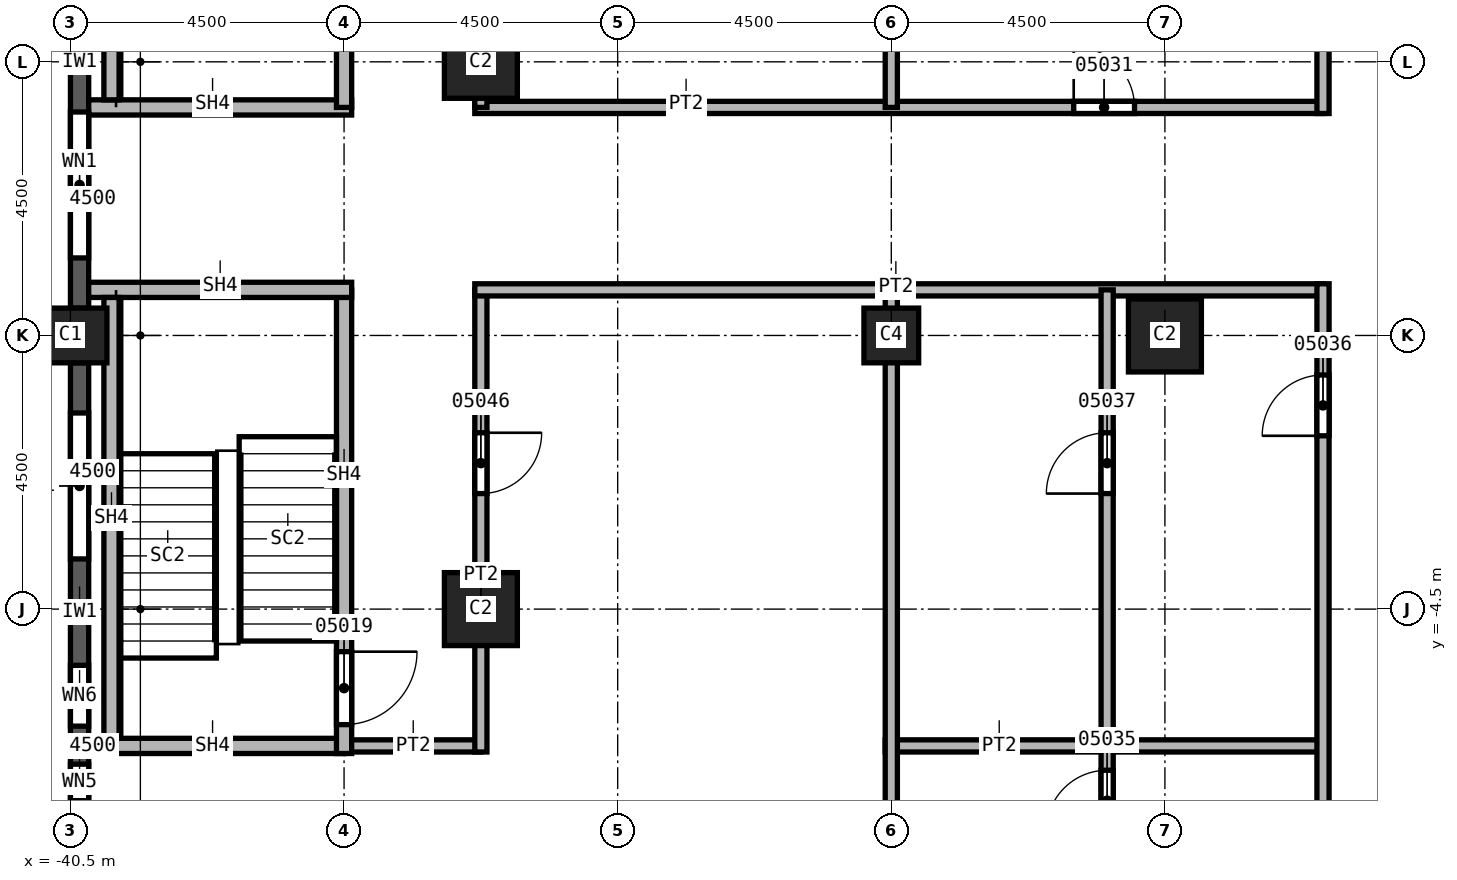
"""IFC4 building model, lengths in metres.
Left out: names, types, materials, properties, quantities, classifications, styles, units other than length and angle.
Written with IfcOpenShell. Run it as: python <this file> out.ifc"""

import sys

from ifc_helpers import new_model, si_unit, direction, frame, frame_2d, origin, origin_2d, place, context, subcontext, project, spatial, rectangle, extrude, element, fill, save


model = new_model("IFC4")
c1 = context("Model", 3, precision=1e-05, world=origin(), true_north=direction((0.0, 1.0)))
c2 = subcontext(c1, "Body", "Model", "MODEL_VIEW")
j1 = project(units=[si_unit("LENGTHUNIT", "METRE"), si_unit("PLANEANGLEUNIT", "RADIAN")], contexts=[c1])
p1 = place(None, origin())
s1 = spatial("IfcSite", under=j1, at=p1, CompositionType="ELEMENT")
p2 = place(p1, origin())
s2 = spatial("IfcBuilding", under=s1, at=p2, CompositionType="ELEMENT")
p3 = place(p2, frame((0.0, 0.0, 112.0)))
s3 = spatial("IfcBuildingStorey", under=s2, at=p3, CompositionType="ELEMENT", Elevation=112.0)
p4 = place(p3, frame((-40.5, 0.0, 0.0), z_axis=(0.0, 0.0, 1.0), x_axis=(0.0, 1.0, 0.0)))
e1 = element("IfcColumn", 1, at=p4, inside=s3, PredefinedType="COLUMN", context=c2, shape_type="SweptSolid", body=[
    extrude(rectangle(XDim=0.9, YDim=1.2, at=origin_2d()), origin(), (0.0, 0.0, 1.0), 3.7),
])
for number, where, z_axis, x_axis in (
    (2, (-33.75, 4.5, 0.0), (0.0, 0.0, 1.0), (1.0, 0.0, 0.0)),
    (3, (-33.75, -4.5, 0.0), (0.0, 0.0, 1.0), (1.0, 0.0, 0.0)),
    (4, (-22.5, 0.0, 0.0), (0.0, 0.0, 1.0), (1.0, 0.0, 0.0)),
):
    element("IfcColumn", number, at=place(p3, frame(where, z_axis=z_axis, x_axis=x_axis)), inside=s3, PredefinedType="COLUMN", context=c2, shape_type="SweptSolid", body=[
        extrude(rectangle(XDim=1.2, YDim=1.2, at=origin_2d()), origin(), (0.0, 0.0, 1.0), 3.7),
    ])
p5 = place(p3, frame((-27.0, 0.0, 0.0), z_axis=(0.0, 0.0, 1.0), x_axis=(1.0, 0.0, 0.0)))
e5 = element("IfcColumn", 5, at=p5, inside=s3, PredefinedType="COLUMN", context=c2, shape_type="SweptSolid", body=[
    extrude(rectangle(XDim=0.9, YDim=0.9, at=origin_2d()), origin(), (0.0, 0.0, 1.0), 3.7),
])
p6 = place(p3, frame((-40.35, 8.55, 0.0), z_axis=(0.0, 0.0, 1.0), x_axis=(0.0, -1.0, 0.0)))
e6 = element("IfcWall", 6, at=p6, inside=s3, PredefinedType="SOLIDWALL", context=c2, shape_type="SweptSolid", body=[
    extrude(rectangle(XDim=8.1, YDim=0.3, at=frame_2d((4.05, 0.0))), origin(), (0.0, 0.0, 1.0), 3.1),
])
p7 = place(p6, frame((0.825, 0.0, 0.8)))
e7 = element("IfcOpeningElement", 7, at=p7, cuts=e6, PredefinedType="OPENING", context=c2, shape_type="SweptSolid", body=[
    extrude(rectangle(XDim=2.4, YDim=1.95, at=frame_2d((1.2, 0.975))), frame((0.0, 0.15, 0.0), z_axis=(0.0, -1.0, 0.0), x_axis=(1.0, 0.0, 0.0)), (0.0, 0.0, 1.0), 0.3),
])
p8 = place(p6, frame((4.875, 0.0, 0.8)))
e8 = element("IfcOpeningElement", 8, at=p8, cuts=e6, PredefinedType="OPENING", context=c2, shape_type="SweptSolid", body=[
    extrude(rectangle(XDim=2.4, YDim=1.95, at=frame_2d((1.2, 0.975))), frame((0.0, 0.15, 0.0), z_axis=(0.0, -1.0, 0.0), x_axis=(1.0, 0.0, 0.0)), (0.0, 0.0, 1.0), 0.3),
])
p9 = place(p3, frame((-40.35, -0.45, 0.0), z_axis=(0.0, 0.0, 1.0), x_axis=(0.0, -1.0, 0.0)))
e9 = element("IfcWall", 9, at=p9, inside=s3, PredefinedType="SOLIDWALL", context=c2, shape_type="SweptSolid", body=[
    extrude(rectangle(XDim=8.1, YDim=0.3, at=frame_2d((4.05, 0.0))), origin(), (0.0, 0.0, 1.0), 3.1),
])
p10 = place(p9, frame((0.825, 0.0, 0.8)))
e10 = element("IfcOpeningElement", 10, at=p10, cuts=e9, PredefinedType="OPENING", context=c2, shape_type="SweptSolid", body=[
    extrude(rectangle(XDim=2.4, YDim=1.95, at=frame_2d((1.2, 0.975))), frame((0.0, 0.15, 0.0), z_axis=(0.0, -1.0, 0.0), x_axis=(1.0, 0.0, 0.0)), (0.0, 0.0, 1.0), 0.3),
])
p11 = place(p9, frame((4.975, 0.0, 0.8)))
e11 = element("IfcOpeningElement", 11, at=p11, cuts=e9, PredefinedType="OPENING", context=c2, shape_type="SweptSolid", body=[
    extrude(rectangle(XDim=1.0, YDim=1.95, at=frame_2d((0.5, 0.975))), frame((0.0, 0.15, 0.0), z_axis=(0.0, -1.0, 0.0), x_axis=(1.0, 0.0, 0.0)), (0.0, 0.0, 1.0), 0.3),
])
p12 = place(p9, frame((6.6, 0.0, 0.8)))
e12 = element("IfcOpeningElement", 12, at=p12, cuts=e9, PredefinedType="OPENING", context=c2, shape_type="SweptSolid", body=[
    extrude(rectangle(XDim=0.6, YDim=1.95, at=frame_2d((0.3, 0.975))), frame((0.0, 0.15, 0.0), z_axis=(0.0, -1.0, 0.0), x_axis=(1.0, 0.0, 0.0)), (0.0, 0.0, 1.0), 0.3),
])
p13 = place(p3, frame((-33.85, 3.75, 0.0), z_axis=(0.0, 0.0, 1.0), x_axis=(1.0, 0.0, 0.0)))
e13 = element("IfcWall", 13, at=p13, inside=s3, PredefinedType="PARTITIONING", context=c2, shape_type="SweptSolid", body=[
    extrude(rectangle(XDim=13.95, YDim=0.2, at=frame_2d((6.975, 0.0))), origin(), (0.0, 0.0, 1.0), 3.7),
])
p14 = place(p13, frame((9.85, 0.0, 0.0)))
e14 = element("IfcOpeningElement", 14, at=p14, cuts=e13, PredefinedType="OPENING", context=c2, shape_type="SweptSolid", body=[
    extrude(rectangle(XDim=1.0, YDim=2.1, at=frame_2d((0.5, 1.05))), frame((0.0, 0.1, 0.0), z_axis=(0.0, -1.0, 0.0), x_axis=(1.0, 0.0, 0.0)), (0.0, 0.0, 1.0), 0.2),
])
p15 = place(p3, frame((-33.75, -6.75, 0.0), z_axis=(0.0, 0.0, 1.0), x_axis=(-1.0, 0.0, 0.0)))
e15 = element("IfcWall", 15, at=p15, inside=s3, PredefinedType="PARTITIONING", context=c2, shape_type="SweptSolid", body=[
    extrude(rectangle(XDim=2.25, YDim=0.2, at=frame_2d((1.125, 0.0))), origin(), (0.0, 0.0, 1.0), 3.7),
])
p16 = place(p3, frame((-33.75, 0.75, 0.0), z_axis=(0.0, 0.0, 1.0), x_axis=(0.0, -1.0, 0.0)))
e16 = element("IfcWall", 16, at=p16, inside=s3, PredefinedType="PARTITIONING", context=c2, shape_type="SweptSolid", body=[
    extrude(rectangle(XDim=7.6, YDim=0.2, at=frame_2d((3.8, 0.0))), origin(), (0.0, 0.0, 1.0), 3.7),
])
p17 = place(p16, frame((2.35, 0.0, 0.0)))
e17 = element("IfcOpeningElement", 17, at=p17, cuts=e16, PredefinedType="OPENING", context=c2, shape_type="SweptSolid", body=[
    extrude(rectangle(XDim=1.0, YDim=2.1, at=frame_2d((0.5, 1.05))), frame((0.0, 0.1, 0.0), z_axis=(0.0, -1.0, 0.0), x_axis=(1.0, 0.0, 0.0)), (0.0, 0.0, 1.0), 0.2),
])
p18 = place(p3, frame((-33.75, 11.25, 0.0), z_axis=(0.0, 0.0, 1.0), x_axis=(0.0, -1.0, 0.0)))
e18 = element("IfcWall", 18, at=p18, inside=s3, PredefinedType="PARTITIONING", context=c2, shape_type="SweptSolid", body=[
    extrude(rectangle(XDim=7.5, YDim=0.2, at=frame_2d((3.75, 0.0))), origin(), (0.0, 0.0, 1.0), 3.7),
])
p19 = place(p18, frame((3.25, 0.0, 0.0)))
e19 = element("IfcOpeningElement", 19, at=p19, cuts=e18, PredefinedType="OPENING", context=c2, shape_type="SweptSolid", body=[
    extrude(rectangle(XDim=1.0, YDim=2.1, at=frame_2d((0.5, 1.05))), frame((0.0, 0.1, 0.0), z_axis=(0.0, -1.0, 0.0), x_axis=(1.0, 0.0, 0.0)), (0.0, 0.0, 1.0), 0.2),
])
p20 = place(p3, frame((-27.1, -6.75, 0.0), z_axis=(0.0, 0.0, 1.0), x_axis=(1.0, 0.0, 0.0)))
e20 = element("IfcWall", 20, at=p20, inside=s3, PredefinedType="PARTITIONING", context=c2, shape_type="SweptSolid", body=[
    extrude(rectangle(XDim=7.2, YDim=0.2, at=frame_2d((3.6, 0.0))), origin(), (0.0, 0.0, 1.0), 3.7),
])
p21 = place(p3, frame((-27.0, -17.4, 0.0), z_axis=(0.0, 0.0, 1.0), x_axis=(0.0, 1.0, 0.0)))
e21 = element("IfcWall", 21, at=p21, inside=s3, PredefinedType="PARTITIONING", context=c2, shape_type="SweptSolid", body=[
    extrude(rectangle(XDim=18.15, YDim=0.2, at=frame_2d((9.075, 0.0))), origin(), (0.0, 0.0, 1.0), 3.7),
])
p22 = place(p3, frame((-27.0, 3.75, 0.0), z_axis=(0.0, 0.0, 1.0), x_axis=(0.0, 1.0, 0.0)))
e22 = element("IfcWall", 22, at=p22, inside=s3, PredefinedType="PARTITIONING", context=c2, shape_type="SweptSolid", body=[
    extrude(rectangle(XDim=13.65, YDim=0.2, at=frame_2d((6.825, 0.0))), origin(), (0.0, 0.0, 1.0), 3.7),
])
p23 = place(p3, frame((-19.9, 0.75, 0.0), z_axis=(0.0, 0.0, 1.0), x_axis=(-1.0, 0.0, 0.0)))
e23 = element("IfcWall", 23, at=p23, inside=s3, PredefinedType="PARTITIONING", context=c2, shape_type="SweptSolid", body=[
    extrude(rectangle(XDim=13.95, YDim=0.2, at=frame_2d((6.975, 0.0))), origin(), (0.0, 0.0, 1.0), 3.7),
])
p24 = place(p3, frame((-23.45, -15.75, 0.0), z_axis=(0.0, 0.0, 1.0), x_axis=(0.0, 1.0, 0.0)))
e24 = element("IfcWall", 24, at=p24, inside=s3, PredefinedType="PARTITIONING", context=c2, shape_type="SweptSolid", body=[
    extrude(rectangle(XDim=16.5, YDim=0.2, at=frame_2d((8.25, 0.0))), origin(), (0.0, 0.0, 1.0), 3.7),
])
p25 = place(p24, frame((7.6, 0.0, 0.0)))
e25 = element("IfcOpeningElement", 25, at=p25, cuts=e24, PredefinedType="OPENING", context=c2, shape_type="SweptSolid", body=[
    extrude(rectangle(XDim=1.0, YDim=2.1, at=frame_2d((0.5, 1.05))), frame((0.0, 0.1, 0.0), z_axis=(0.0, -1.0, 0.0), x_axis=(1.0, 0.0, 0.0)), (0.0, 0.0, 1.0), 0.2),
])
p26 = place(p24, frame((13.15, 0.0, 0.0)))
e26 = element("IfcOpeningElement", 26, at=p26, cuts=e24, PredefinedType="OPENING", context=c2, shape_type="SweptSolid", body=[
    extrude(rectangle(XDim=1.0, YDim=2.1, at=frame_2d((0.5, 1.05))), frame((0.0, 0.1, 0.0), z_axis=(0.0, -1.0, 0.0), x_axis=(1.0, 0.0, 0.0)), (0.0, 0.0, 1.0), 0.2),
])
p27 = place(p3, frame((-19.9, -24.5, 0.0), z_axis=(0.0, 0.0, 1.0), x_axis=(0.0, 1.0, 0.0)))
e27 = element("IfcWall", 27, at=p27, inside=s3, PredefinedType="PARTITIONING", context=c2, shape_type="SweptSolid", body=[
    extrude(rectangle(XDim=25.35, YDim=0.2, at=frame_2d((12.675, 0.0))), origin(), (0.0, 0.0, 1.0), 3.7),
])
p28 = place(p27, frame((2.05, 0.0, 0.0)))
e28 = element("IfcOpeningElement", 28, at=p28, cuts=e27, PredefinedType="OPENING", context=c2, shape_type="SweptSolid", body=[
    extrude(rectangle(XDim=1.0, YDim=2.1, at=frame_2d((0.5, 1.05))), frame((0.0, 0.1, 0.0), z_axis=(0.0, -1.0, 0.0), x_axis=(1.0, 0.0, 0.0)), (0.0, 0.0, 1.0), 0.2),
])
p29 = place(p27, frame((10.1, 0.0, 0.0)))
e29 = element("IfcOpeningElement", 29, at=p29, cuts=e27, PredefinedType="OPENING", context=c2, shape_type="SweptSolid", body=[
    extrude(rectangle(XDim=1.0, YDim=2.1, at=frame_2d((0.5, 1.05))), frame((0.0, 0.1, 0.0), z_axis=(0.0, -1.0, 0.0), x_axis=(1.0, 0.0, 0.0)), (0.0, 0.0, 1.0), 0.2),
])
p30 = place(p27, frame((22.85, 0.0, 0.0)))
e30 = element("IfcOpeningElement", 30, at=p30, cuts=e27, PredefinedType="OPENING", context=c2, shape_type="SweptSolid", body=[
    extrude(rectangle(XDim=1.0, YDim=2.1, at=frame_2d((0.5, 1.05))), frame((0.0, 0.1, 0.0), z_axis=(0.0, -1.0, 0.0), x_axis=(1.0, 0.0, 0.0)), (0.0, 0.0, 1.0), 0.2),
])
p31 = place(p3, frame((-19.9, 3.65, 0.0), z_axis=(0.0, 0.0, 1.0), x_axis=(0.0, 1.0, 0.0)))
e31 = element("IfcWall", 31, at=p31, inside=s3, PredefinedType="PARTITIONING", context=c2, shape_type="SweptSolid", body=[
    extrude(rectangle(XDim=9.95, YDim=0.2, at=frame_2d((4.975, 0.0))), origin(), (0.0, 0.0, 1.0), 3.7),
])
p32 = place(p31, frame((6.25, 0.0, 0.0)))
e32 = element("IfcOpeningElement", 32, at=p32, cuts=e31, PredefinedType="OPENING", context=c2, shape_type="SweptSolid", body=[
    extrude(rectangle(XDim=1.0, YDim=2.1, at=frame_2d((0.5, 1.05))), frame((0.0, 0.1, 0.0), z_axis=(0.0, -1.0, 0.0), x_axis=(1.0, 0.0, 0.0)), (0.0, 0.0, 1.0), 0.2),
])
p33 = place(p3, frame((-40.2, 3.75, 0.0), z_axis=(0.0, 0.0, 1.0), x_axis=(1.0, 0.0, 0.0)))
e33 = element("IfcWall", 33, at=p33, inside=s3, PredefinedType="SOLIDWALL", context=c2, shape_type="SweptSolid", body=[
    extrude(rectangle(XDim=4.325, YDim=0.25, at=frame_2d((2.163, 0.0))), origin(), (0.0, 0.0, 1.0), 3.7),
])
p34 = place(p3, frame((-36.0, -6.75, 0.0), z_axis=(0.0, 0.0, 1.0), x_axis=(-1.0, 0.0, 0.0)))
e34 = element("IfcWall", 34, at=p34, inside=s3, PredefinedType="SOLIDWALL", context=c2, shape_type="SweptSolid", body=[
    extrude(rectangle(XDim=4.2, YDim=0.25, at=frame_2d((2.1, 0.0))), origin(), (0.0, 0.0, 1.0), 3.7),
])
p35 = place(p3, frame((-36.0, 0.75, 0.0), z_axis=(0.0, 0.0, 1.0), x_axis=(0.0, -1.0, 0.0)))
e35 = element("IfcWall", 35, at=p35, inside=s3, PredefinedType="SOLIDWALL", context=c2, shape_type="SweptSolid", body=[
    extrude(rectangle(XDim=7.625, YDim=0.25, at=frame_2d((3.812, 0.0))), origin(), (0.0, 0.0, 1.0), 3.7),
])
p36 = place(p35, frame((5.95, 0.0, 0.0)))
e36 = element("IfcOpeningElement", 36, at=p36, cuts=e35, PredefinedType="OPENING", context=c2, shape_type="SweptSolid", body=[
    extrude(rectangle(XDim=1.2, YDim=2.1, at=frame_2d((0.6, 1.05))), frame((0.0, 0.125, 0.0), z_axis=(0.0, -1.0, 0.0), x_axis=(1.0, 0.0, 0.0)), (0.0, 0.0, 1.0), 0.25),
])
p37 = place(p3, frame((-36.0, 11.375, 0.0), z_axis=(0.0, 0.0, 1.0), x_axis=(0.0, -1.0, 0.0)))
e37 = element("IfcWall", 37, at=p37, inside=s3, PredefinedType="SOLIDWALL", context=c2, shape_type="SweptSolid", body=[
    extrude(rectangle(XDim=7.625, YDim=0.25, at=frame_2d((3.812, 0.0))), origin(), (0.0, 0.0, 1.0), 3.7),
])
p38 = place(p37, frame((0.4, 0.0, 0.0)))
e38 = element("IfcOpeningElement", 38, at=p38, cuts=e37, PredefinedType="OPENING", context=c2, shape_type="SweptSolid", body=[
    extrude(rectangle(XDim=1.2, YDim=2.1, at=frame_2d((0.6, 1.05))), frame((0.0, 0.125, 0.0), z_axis=(0.0, -1.0, 0.0), x_axis=(1.0, 0.0, 0.0)), (0.0, 0.0, 1.0), 0.25),
])
p39 = place(p3, frame((-35.875, 0.75, 0.0), z_axis=(0.0, 0.0, 1.0), x_axis=(-1.0, 0.0, 0.0)))
e39 = element("IfcWall", 39, at=p39, inside=s3, PredefinedType="SOLIDWALL", context=c2, shape_type="SweptSolid", body=[
    extrude(rectangle(XDim=4.325, YDim=0.25, at=frame_2d((2.163, 0.0))), origin(), (0.0, 0.0, 1.0), 3.7),
])
for number, where, z_axis, x_axis in (
    (40, (-39.825, 3.875, 0.0), (0.0, 0.0, 1.0), (0.0, 1.0, 0.0)),
    (41, (-39.825, -6.625, 0.0), (0.0, 0.0, 1.0), (0.0, 1.0, 0.0)),
):
    element("IfcWall", number, at=place(p3, frame(where, z_axis=z_axis, x_axis=x_axis)), inside=s3, PredefinedType="SOLIDWALL", context=c2, shape_type="SweptSolid", body=[
        extrude(rectangle(XDim=7.25, YDim=0.25, at=frame_2d((3.625, 0.0))), origin(), (0.0, 0.0, 1.0), 3.7),
    ])
p40 = place(p8, origin())
e42 = element("IfcWindow", 42, at=p40, inside=s3, PartitioningType="SINGLE_PANEL", PredefinedType="WINDOW", context=c2, shape_type="SweptSolid", body=[
    extrude(rectangle(XDim=2.4, YDim=1.95, at=frame_2d((1.2, 0.975))), frame((0.0, 0.03, 0.0), z_axis=(0.0, -1.0, 0.0), x_axis=(1.0, 0.0, 0.0)), (0.0, 0.0, 1.0), 0.06),
])
fill(e8, e42)
p41 = place(p10, origin())
e43 = element("IfcWindow", 43, at=p41, inside=s3, PartitioningType="SINGLE_PANEL", PredefinedType="WINDOW", context=c2, shape_type="SweptSolid", body=[
    extrude(rectangle(XDim=2.4, YDim=1.95, at=frame_2d((1.2, 0.975))), frame((0.0, 0.03, 0.0), z_axis=(0.0, -1.0, 0.0), x_axis=(1.0, 0.0, 0.0)), (0.0, 0.0, 1.0), 0.06),
])
fill(e10, e43)
p42 = place(p36, origin())
e44 = element("IfcDoor", 44, at=p42, inside=s3, OperationType="SINGLE_SWING_RIGHT", PredefinedType="DOOR", context=c2, shape_type="SweptSolid", body=[
    extrude(rectangle(XDim=1.2, YDim=2.1, at=frame_2d((0.6, 1.05))), frame((0.0, 0.025, 0.0), z_axis=(0.0, -1.0, 0.0), x_axis=(1.0, 0.0, 0.0)), (0.0, 0.0, 1.0), 0.05),
])
fill(e36, e44)
p43 = place(p14, origin())
e45 = element("IfcDoor", 45, at=p43, inside=s3, OperationType="SINGLE_SWING_RIGHT", PredefinedType="DOOR", context=c2, shape_type="SweptSolid", body=[
    extrude(rectangle(XDim=1.0, YDim=2.1, at=frame_2d((0.5, 1.05))), frame((0.0, 0.025, 0.0), z_axis=(0.0, -1.0, 0.0), x_axis=(1.0, 0.0, 0.0)), (0.0, 0.0, 1.0), 0.05),
])
fill(e14, e45)
p44 = place(p25, origin())
e46 = element("IfcDoor", 46, at=p44, inside=s3, OperationType="SINGLE_SWING_RIGHT", PredefinedType="DOOR", context=c2, shape_type="SweptSolid", body=[
    extrude(rectangle(XDim=1.0, YDim=2.1, at=frame_2d((0.5, 1.05))), frame((0.0, 0.025, 0.0), z_axis=(0.0, -1.0, 0.0), x_axis=(1.0, 0.0, 0.0)), (0.0, 0.0, 1.0), 0.05),
])
fill(e25, e46)
p45 = place(p30, origin())
e47 = element("IfcDoor", 47, at=p45, inside=s3, OperationType="SINGLE_SWING_LEFT", PredefinedType="DOOR", context=c2, shape_type="SweptSolid", body=[
    extrude(rectangle(XDim=1.0, YDim=2.1, at=frame_2d((0.5, 1.05))), frame((0.0, 0.025, 0.0), z_axis=(0.0, -1.0, 0.0), x_axis=(1.0, 0.0, 0.0)), (0.0, 0.0, 1.0), 0.05),
])
fill(e30, e47)
p46 = place(p26, origin())
e48 = element("IfcDoor", 48, at=p46, inside=s3, OperationType="SINGLE_SWING_RIGHT", PredefinedType="DOOR", context=c2, shape_type="SweptSolid", body=[
    extrude(rectangle(XDim=1.0, YDim=2.1, at=frame_2d((0.5, 1.05))), frame((0.0, 0.025, 0.0), z_axis=(0.0, -1.0, 0.0), x_axis=(1.0, 0.0, 0.0)), (0.0, 0.0, 1.0), 0.05),
])
fill(e26, e48)
p47 = place(p17, origin())
e49 = element("IfcDoor", 49, at=p47, inside=s3, OperationType="SINGLE_SWING_LEFT", PredefinedType="DOOR", context=c2, shape_type="SweptSolid", body=[
    extrude(rectangle(XDim=1.0, YDim=2.1, at=frame_2d((0.5, 1.05))), frame((0.0, 0.025, 0.0), z_axis=(0.0, -1.0, 0.0), x_axis=(1.0, 0.0, 0.0)), (0.0, 0.0, 1.0), 0.05),
])
fill(e17, e49)
p48 = place(p11, origin())
e50 = element("IfcWindow", 50, at=p48, inside=s3, PartitioningType="SINGLE_PANEL", PredefinedType="WINDOW", context=c2, shape_type="SweptSolid", body=[
    extrude(rectangle(XDim=1.0, YDim=1.95, at=frame_2d((0.5, 0.975))), frame((0.0, 0.03, 0.0), z_axis=(0.0, -1.0, 0.0), x_axis=(1.0, 0.0, 0.0)), (0.0, 0.0, 1.0), 0.06),
])
fill(e11, e50)
p49 = place(p12, origin())
e51 = element("IfcWindow", 51, at=p49, inside=s3, PartitioningType="SINGLE_PANEL", PredefinedType="WINDOW", context=c2, shape_type="SweptSolid", body=[
    extrude(rectangle(XDim=0.6, YDim=1.95, at=frame_2d((0.3, 0.975))), frame((0.0, 0.03, 0.0), z_axis=(0.0, -1.0, 0.0), x_axis=(1.0, 0.0, 0.0)), (0.0, 0.0, 1.0), 0.06),
])
fill(e12, e51)
save(model, sys.argv[1])
